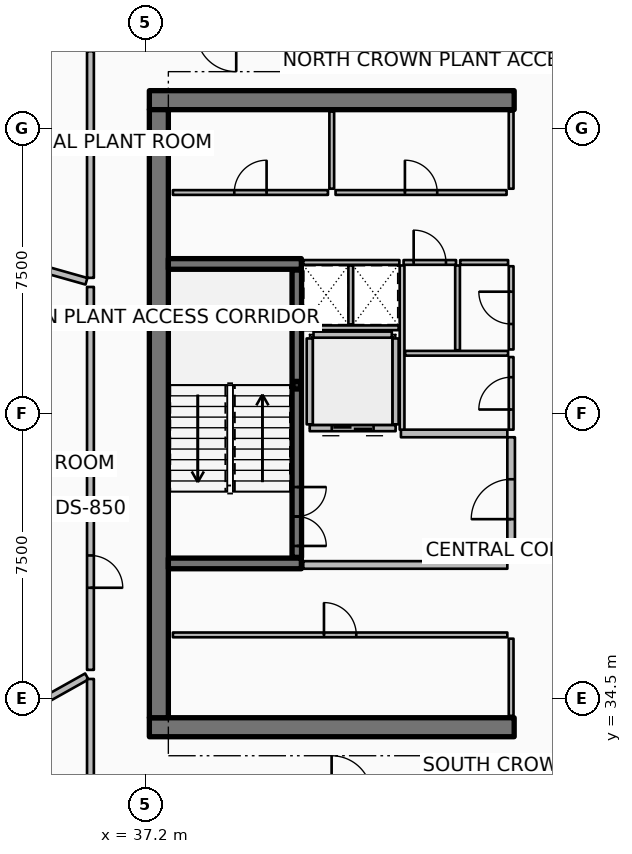
"""IFC4 building model, lengths in metres.
Left out: names, types, materials, properties, quantities, classifications, styles, units other than length and angle.
Written with IfcOpenShell. Run it as: python <this file> out.ifc"""

import sys

from ifc_helpers import new_model, si_unit, direction, frame, frame_2d, origin, origin_2d, place, context, subcontext, project, spatial, rectangle, hollow_rectangle, extrude, element, fill, save


model = new_model("IFC4")
c1 = context("Model", 3, precision=1e-05, world=origin(), true_north=direction((0.0, 1.0)))
c2 = subcontext(c1, "Body", "Model", "MODEL_VIEW")
j1 = project(units=[si_unit("LENGTHUNIT", "METRE"), si_unit("PLANEANGLEUNIT", "RADIAN")], contexts=[c1])
p1 = place(None, origin())
s1 = spatial("IfcSite", under=j1, at=p1, CompositionType="ELEMENT")
p2 = place(p1, origin())
s2 = spatial("IfcBuilding", under=s1, at=p2, CompositionType="ELEMENT")
p3 = place(p2, frame((0.0, 0.0, 359.6)))
s3 = spatial("IfcBuildingStorey", under=s2, at=p3, CompositionType="ELEMENT", Elevation=359.6)
for number, where, z_axis, x_axis in (
    (1, (37.3, 33.75, 0.0), (0.0, 0.0, 1.0), (1.0, 0.0, 0.0)),
    (2, (37.3, 50.25, 0.0), (0.0, 0.0, 1.0), (1.0, 0.0, 0.0)),
):
    element("IfcWall", number, at=place(p3, frame(where, z_axis=z_axis, x_axis=x_axis)), inside=s3, PredefinedType="SHEAR", context=c2, shape_type="SweptSolid", body=[
        extrude(rectangle(XDim=9.6, YDim=0.5, at=frame_2d((4.8, 0.0))), origin(), (0.0, 0.0, 1.0), 3.6),
    ])
p4 = place(p3, frame((37.55, 34.0, 0.0), z_axis=(0.0, 0.0, 1.0), x_axis=(0.0, 1.0, 0.0)))
e3 = element("IfcWall", 3, at=p4, inside=s3, PredefinedType="SHEAR", context=c2, shape_type="SweptSolid", body=[
    extrude(rectangle(XDim=16.0, YDim=0.5, at=frame_2d((8.0, 0.0))), origin(), (0.0, 0.0, 1.0), 3.6),
])
for number, where, z_axis, x_axis in (
    (4, (37.8, 38.06, 0.0), (0.0, 0.0, 1.0), (1.0, 0.0, 0.0)),
    (5, (37.8, 45.94, 0.0), (0.0, 0.0, 1.0), (1.0, 0.0, 0.0)),
):
    element("IfcWall", number, at=place(p3, frame(where, z_axis=z_axis, x_axis=x_axis)), inside=s3, PredefinedType="SHEAR", context=c2, shape_type="SweptSolid", body=[
        extrude(rectangle(XDim=3.5, YDim=0.28, at=frame_2d((1.75, 0.0))), origin(), (0.0, 0.0, 1.0), 3.6),
    ])
p5 = place(p3, frame((41.18, 42.75, 0.0), z_axis=(0.0, 0.0, 1.0), x_axis=(1.0, 0.0, 0.0)))
e6 = element("IfcColumn", 6, at=p5, inside=s3, PredefinedType="COLUMN", context=c2, shape_type="SweptSolid", body=[
    extrude(hollow_rectangle(XDim=0.2, YDim=0.2, WallThickness=0.01, InnerFilletRadius=0.01, OuterFilletRadius=0.02, at=origin_2d()), origin(), (0.0, 0.0, 1.0), 1.595),
])
p6 = place(p3, frame((41.18, 38.22, 0.0), z_axis=(0.0, 0.0, 1.0), x_axis=(0.0, 1.0, 0.0)))
e7 = element("IfcWall", 7, at=p6, inside=s3, PredefinedType="SOLIDWALL", context=c2, shape_type="SweptSolid", body=[
    extrude(rectangle(XDim=7.56, YDim=0.25, at=frame_2d((3.78, 0.0))), origin(), (0.0, 0.0, 1.0), 3.32),
])
p7 = place(p6, frame((0.3, 0.0, 0.0)))
e8 = element("IfcOpeningElement", 8, at=p7, cuts=e7, PredefinedType="OPENING", context=c2, shape_type="SweptSolid", body=[
    extrude(rectangle(XDim=1.55, YDim=2.15, at=frame_2d((0.775, 1.075))), frame((0.0, 0.135, 0.0), z_axis=(0.0, -1.0, 0.0), x_axis=(1.0, 0.0, 0.0)), (0.0, 0.0, 1.0), 0.27),
])
p8 = place(p3, frame((43.78, 41.62, 0.0), z_axis=(0.0, 0.0, 1.0), x_axis=(-1.0, 0.0, 0.0)))
e9 = element("IfcWall", 9, at=p8, inside=s3, PredefinedType="PARTITIONING", context=c2, shape_type="SweptSolid", body=[
    extrude(rectangle(XDim=2.26, YDim=0.16, at=frame_2d((1.13, 0.0))), origin(), (0.0, 0.0, 1.0), 3.32),
])
p9 = place(p8, frame((0.58, 0.0, 0.0)))
e10 = element("IfcOpeningElement", 10, at=p9, cuts=e9, PredefinedType="OPENING", context=c2, shape_type="SweptSolid", body=[
    extrude(rectangle(XDim=1.1, YDim=2.1, at=frame_2d((0.55, 1.05))), frame((0.0, 0.09, 0.0), z_axis=(0.0, -1.0, 0.0), x_axis=(1.0, 0.0, 0.0)), (0.0, 0.0, 1.0), 0.18),
])
for number, where, z_axis, x_axis in (
    (11, (43.78, 41.72, 0.0), (0.0, 0.0, 1.0), (0.0, 1.0, 0.0)),
    (12, (41.52, 41.72, 0.0), (0.0, 0.0, 1.0), (0.0, 1.0, 0.0)),
):
    element("IfcWall", number, at=place(p3, frame(where, z_axis=z_axis, x_axis=x_axis)), inside=s3, PredefinedType="PARTITIONING", context=c2, shape_type="SweptSolid", body=[
        extrude(rectangle(XDim=2.26, YDim=0.16, at=frame_2d((1.13, 0.0))), origin(), (0.0, 0.0, 1.0), 3.32),
    ])
p10 = place(p3, frame((41.62, 44.08, 0.0), z_axis=(0.0, 0.0, 1.0), x_axis=(1.0, 0.0, 0.0)))
e13 = element("IfcWall", 13, at=p10, inside=s3, PredefinedType="PARTITIONING", context=c2, shape_type="SweptSolid", body=[
    extrude(rectangle(XDim=2.06, YDim=0.16, at=frame_2d((1.03, 0.0))), origin(), (0.0, 0.0, 1.0), 3.32),
])
p11 = place(p3, frame((46.82, 34.05, 0.0), z_axis=(0.0, 0.0, 1.0), x_axis=(0.0, 1.0, 0.0)))
e14 = element("IfcWall", 14, at=p11, inside=s3, PredefinedType="PARTITIONING", context=c2, shape_type="SweptSolid", body=[
    extrude(rectangle(XDim=2.03, YDim=0.125, at=frame_2d((1.015, 0.0))), origin(), (0.0, 0.0, 1.0), 2.76),
])
p12 = place(p3, frame((37.92, 36.18, 0.0), z_axis=(0.0, 0.0, 1.0), x_axis=(1.0, 0.0, 0.0)))
e15 = element("IfcWall", 15, at=p12, inside=s3, PredefinedType="PARTITIONING", context=c2, shape_type="SweptSolid", body=[
    extrude(rectangle(XDim=8.8, YDim=0.125, at=frame_2d((4.4, 0.0))), origin(), (0.0, 0.0, 1.0), 2.76),
])
p13 = place(p12, frame((3.975, 0.0, 0.0)))
e16 = element("IfcOpeningElement", 16, at=p13, cuts=e15, PredefinedType="OPENING", context=c2, shape_type="SweptSolid", body=[
    extrude(rectangle(XDim=0.85, YDim=2.06, at=frame_2d((0.425, 1.03))), frame((0.0, 0.073, 0.0), z_axis=(0.0, -1.0, 0.0), x_axis=(1.0, 0.0, 0.0)), (0.0, 0.0, 1.0), 0.145),
])
for number, where, z_axis, x_axis in (
    (17, (46.82, 47.92, 0.0), (0.0, 0.0, 1.0), (0.0, 1.0, 0.0)),
    (18, (42.1, 47.92, 0.0), (0.0, 0.0, 1.0), (0.0, 1.0, 0.0)),
):
    element("IfcWall", number, at=place(p3, frame(where, z_axis=z_axis, x_axis=x_axis)), inside=s3, PredefinedType="PARTITIONING", context=c2, shape_type="SweptSolid", body=[
        extrude(rectangle(XDim=2.03, YDim=0.125, at=frame_2d((1.015, 0.0))), origin(), (0.0, 0.0, 1.0), 2.76),
    ])
p14 = place(p3, frame((37.92, 47.82, 0.0), z_axis=(0.0, 0.0, 1.0), x_axis=(1.0, 0.0, 0.0)))
e19 = element("IfcWall", 19, at=p14, inside=s3, PredefinedType="PARTITIONING", context=c2, shape_type="SweptSolid", body=[
    extrude(rectangle(XDim=4.08, YDim=0.125, at=frame_2d((2.04, 0.0))), origin(), (0.0, 0.0, 1.0), 2.76),
])
p15 = place(p14, frame((1.615, 0.0, 0.0)))
e20 = element("IfcOpeningElement", 20, at=p15, cuts=e19, PredefinedType="OPENING", context=c2, shape_type="SweptSolid", body=[
    extrude(rectangle(XDim=0.85, YDim=2.06, at=frame_2d((0.425, 1.03))), frame((0.0, 0.073, 0.0), z_axis=(0.0, -1.0, 0.0), x_axis=(1.0, 0.0, 0.0)), (0.0, 0.0, 1.0), 0.145),
])
p16 = place(p3, frame((42.2, 47.82, 0.0), z_axis=(0.0, 0.0, 1.0), x_axis=(1.0, 0.0, 0.0)))
e21 = element("IfcWall", 21, at=p16, inside=s3, PredefinedType="PARTITIONING", context=c2, shape_type="SweptSolid", body=[
    extrude(rectangle(XDim=4.5, YDim=0.125, at=frame_2d((2.25, 0.0))), origin(), (0.0, 0.0, 1.0), 2.76),
])
p17 = place(p16, frame((1.825, 0.0, 0.0)))
e22 = element("IfcOpeningElement", 22, at=p17, cuts=e21, PredefinedType="OPENING", context=c2, shape_type="SweptSolid", body=[
    extrude(rectangle(XDim=0.85, YDim=2.06, at=frame_2d((0.425, 1.03))), frame((0.0, 0.073, 0.0), z_axis=(0.0, -1.0, 0.0), x_axis=(1.0, 0.0, 0.0)), (0.0, 0.0, 1.0), 0.145),
])
p18 = place(p3, frame((41.35, 38.02, 0.0), z_axis=(0.0, 0.0, 1.0), x_axis=(1.0, 0.0, 0.0)))
e23 = element("IfcWall", 23, at=p18, inside=s3, PredefinedType="PARTITIONING", context=c2, shape_type="SweptSolid", body=[
    extrude(rectangle(XDim=5.37, YDim=0.2, at=frame_2d((2.685, 0.0))), origin(), (0.0, 0.0, 1.0), 3.32),
])
p19 = place(p3, frame((43.92, 41.48, 0.0), z_axis=(0.0, 0.0, 1.0), x_axis=(1.0, 0.0, 0.0)))
e24 = element("IfcWall", 24, at=p19, inside=s3, PredefinedType="PARTITIONING", context=c2, shape_type="SweptSolid", body=[
    extrude(rectangle(XDim=2.8, YDim=0.2, at=frame_2d((1.4, 0.0))), origin(), (0.0, 0.0, 1.0), 3.32),
])
p20 = place(p3, frame((46.82, 38.12, 0.0), z_axis=(0.0, 0.0, 1.0), x_axis=(0.0, 1.0, 0.0)))
e25 = element("IfcWall", 25, at=p20, inside=s3, PredefinedType="PARTITIONING", context=c2, shape_type="SweptSolid", body=[
    extrude(rectangle(XDim=3.26, YDim=0.2, at=frame_2d((1.63, 0.0))), origin(), (0.0, 0.0, 1.0), 3.32),
])
p21 = place(p20, frame((1.105, 0.0, 0.0)))
e26 = element("IfcOpeningElement", 26, at=p21, cuts=e25, PredefinedType="OPENING", context=c2, shape_type="SweptSolid", body=[
    extrude(rectangle(XDim=1.05, YDim=2.1, at=frame_2d((0.525, 1.05))), frame((0.0, 0.11, 0.0), z_axis=(0.0, -1.0, 0.0), x_axis=(1.0, 0.0, 0.0)), (0.0, 0.0, 1.0), 0.22),
])
p22 = place(p3, frame((41.36, 44.26, 0.0), z_axis=(0.0, 0.0, 1.0), x_axis=(1.0, 0.0, 0.0)))
e27 = element("IfcWall", 27, at=p22, inside=s3, PredefinedType="PARTITIONING", context=c2, shape_type="SweptSolid", body=[
    extrude(rectangle(XDim=2.5, YDim=0.125, at=frame_2d((1.25, 0.0))), origin(), (0.0, 0.0, 1.0), 2.76),
])
p23 = place(p3, frame((42.6, 44.35, 0.0), z_axis=(0.0, 0.0, 1.0), x_axis=(0.0, 1.0, 0.0)))
e28 = element("IfcWall", 28, at=p23, inside=s3, PredefinedType="PARTITIONING", context=c2, shape_type="SweptSolid", body=[
    extrude(rectangle(XDim=1.55, YDim=0.125, at=frame_2d((0.775, 0.0))), origin(), (0.0, 0.0, 1.0), 2.76),
])
p24 = place(p3, frame((43.95, 41.58, 0.0), z_axis=(0.0, 0.0, 1.0), x_axis=(0.0, 1.0, 0.0)))
e29 = element("IfcWall", 29, at=p24, inside=s3, PredefinedType="PARTITIONING", context=c2, shape_type="SweptSolid", body=[
    extrude(rectangle(XDim=4.32, YDim=0.125, at=frame_2d((2.16, 0.0))), origin(), (0.0, 0.0, 1.0), 2.76),
])
p25 = place(p3, frame((44.03, 43.59, 0.0), z_axis=(0.0, 0.0, 1.0), x_axis=(1.0, 0.0, 0.0)))
e30 = element("IfcWall", 30, at=p25, inside=s3, PredefinedType="PARTITIONING", context=c2, shape_type="SweptSolid", body=[
    extrude(rectangle(XDim=2.71, YDim=0.125, at=frame_2d((1.355, 0.0))), origin(), (0.0, 0.0, 1.0), 2.76),
])
p26 = place(p3, frame((45.41, 43.67, 0.0), z_axis=(0.0, 0.0, 1.0), x_axis=(0.0, 1.0, 0.0)))
e31 = element("IfcWall", 31, at=p26, inside=s3, PredefinedType="PARTITIONING", context=c2, shape_type="SweptSolid", body=[
    extrude(rectangle(XDim=2.23, YDim=0.125, at=frame_2d((1.115, 0.0))), origin(), (0.0, 0.0, 1.0), 2.76),
])
p27 = place(p3, frame((46.82, 41.58, 0.0), z_axis=(0.0, 0.0, 1.0), x_axis=(0.0, 1.0, 0.0)))
e32 = element("IfcWall", 32, at=p27, inside=s3, PredefinedType="PARTITIONING", context=c2, shape_type="SweptSolid", body=[
    extrude(rectangle(XDim=1.91, YDim=0.125, at=frame_2d((0.955, 0.0))), origin(), (0.0, 0.0, 1.0), 2.76),
])
p28 = place(p27, frame((0.53, 0.0, 0.0)))
e33 = element("IfcOpeningElement", 33, at=p28, cuts=e32, PredefinedType="OPENING", context=c2, shape_type="SweptSolid", body=[
    extrude(rectangle(XDim=0.85, YDim=2.06, at=frame_2d((0.425, 1.03))), frame((0.0, 0.073, 0.0), z_axis=(0.0, -1.0, 0.0), x_axis=(1.0, 0.0, 0.0)), (0.0, 0.0, 1.0), 0.145),
])
p29 = place(p3, frame((46.82, 43.69, 0.0), z_axis=(0.0, 0.0, 1.0), x_axis=(0.0, 1.0, 0.0)))
e34 = element("IfcWall", 34, at=p29, inside=s3, PredefinedType="PARTITIONING", context=c2, shape_type="SweptSolid", body=[
    extrude(rectangle(XDim=2.19, YDim=0.125, at=frame_2d((1.095, 0.0))), origin(), (0.0, 0.0, 1.0), 2.76),
])
p30 = place(p29, frame((0.67, 0.0, 0.0)))
e35 = element("IfcOpeningElement", 35, at=p30, cuts=e34, PredefinedType="OPENING", context=c2, shape_type="SweptSolid", body=[
    extrude(rectangle(XDim=0.85, YDim=2.06, at=frame_2d((0.425, 1.03))), frame((0.0, 0.073, 0.0), z_axis=(0.0, -1.0, 0.0), x_axis=(1.0, 0.0, 0.0)), (0.0, 0.0, 1.0), 0.145),
])
p31 = place(p3, frame((41.35, 45.98, 0.0), z_axis=(0.0, 0.0, 1.0), x_axis=(1.0, 0.0, 0.0)))
e36 = element("IfcWall", 36, at=p31, inside=s3, PredefinedType="PARTITIONING", context=c2, shape_type="SweptSolid", body=[
    extrude(rectangle(XDim=2.53, YDim=0.125, at=frame_2d((1.265, 0.0))), origin(), (0.0, 0.0, 1.0), 2.76),
])
p32 = place(p3, frame((43.99, 45.98, 0.0), z_axis=(0.0, 0.0, 1.0), x_axis=(1.0, 0.0, 0.0)))
e37 = element("IfcWall", 37, at=p32, inside=s3, PredefinedType="PARTITIONING", context=c2, shape_type="SweptSolid", body=[
    extrude(rectangle(XDim=1.38, YDim=0.125, at=frame_2d((0.69, 0.0))), origin(), (0.0, 0.0, 1.0), 2.76),
])
p33 = place(p32, frame((0.265, 0.0, 0.0)))
e38 = element("IfcOpeningElement", 38, at=p33, cuts=e37, PredefinedType="OPENING", context=c2, shape_type="SweptSolid", body=[
    extrude(rectangle(XDim=0.85, YDim=2.06, at=frame_2d((0.425, 1.03))), frame((0.0, 0.073, 0.0), z_axis=(0.0, -1.0, 0.0), x_axis=(1.0, 0.0, 0.0)), (0.0, 0.0, 1.0), 0.145),
])
p34 = place(p3, frame((45.48, 45.98, 0.0), z_axis=(0.0, 0.0, 1.0), x_axis=(1.0, 0.0, 0.0)))
e39 = element("IfcWall", 39, at=p34, inside=s3, PredefinedType="PARTITIONING", context=c2, shape_type="SweptSolid", body=[
    extrude(rectangle(XDim=1.26, YDim=0.125, at=frame_2d((0.63, 0.0))), origin(), (0.0, 0.0, 1.0), 2.76),
])
p35 = place(p3, frame((35.75, 51.537, 0.0), z_axis=(0.0, 0.0, 1.0), x_axis=(0.0, -1.0, 0.0)))
e40 = element("IfcWall", 40, at=p35, inside=s3, PredefinedType="PARTITIONING", context=c2, shape_type="SweptSolid", body=[
    extrude(rectangle(XDim=5.962, YDim=0.18, at=frame_2d((2.981, 0.0))), origin(), (0.0, 0.0, 1.0), 2.76),
])
p36 = place(p3, frame((35.644, 45.485, 0.0), z_axis=(0.0, 0.0, 1.0), x_axis=(-0.96245862205, 0.271428445159, 0.0)))
e41 = element("IfcWall", 41, at=p36, inside=s3, PredefinedType="PARTITIONING", context=c2, shape_type="SweptSolid", body=[
    extrude(rectangle(XDim=7.495, YDim=0.18, at=frame_2d((3.748, 0.0))), origin(), (0.0, 0.0, 1.0), 2.76),
])
p37 = place(p3, frame((35.75, 45.335, 0.0), z_axis=(0.0, 0.0, 1.0), x_axis=(0.0, -1.0, 0.0)))
e42 = element("IfcWall", 42, at=p37, inside=s3, PredefinedType="PARTITIONING", context=c2, shape_type="SweptSolid", body=[
    extrude(rectangle(XDim=4.665, YDim=0.18, at=frame_2d((2.333, 0.0))), origin(), (0.0, 0.0, 1.0), 2.76),
])
p38 = place(p3, frame((35.75, 40.43, 0.0), z_axis=(0.0, 0.0, 1.0), x_axis=(0.0, -1.0, 0.0)))
e43 = element("IfcWall", 43, at=p38, inside=s3, PredefinedType="PARTITIONING", context=c2, shape_type="SweptSolid", body=[
    extrude(rectangle(XDim=5.17, YDim=0.18, at=frame_2d((2.585, 0.0))), origin(), (0.0, 0.0, 1.0), 2.76),
])
p39 = place(p38, frame((2.16, 0.0, 0.0)))
e44 = element("IfcOpeningElement", 44, at=p39, cuts=e43, PredefinedType="OPENING", context=c2, shape_type="SweptSolid", body=[
    extrude(rectangle(XDim=0.85, YDim=2.06, at=frame_2d((0.425, 1.03))), frame((0.0, 0.1, 0.0), z_axis=(0.0, -1.0, 0.0), x_axis=(1.0, 0.0, 0.0)), (0.0, 0.0, 1.0), 0.2),
])
p40 = place(p3, frame((35.654, 35.086, 0.0), z_axis=(0.0, 0.0, 1.0), x_axis=(-0.872497667023, -0.488618277432, 0.0)))
e45 = element("IfcWall", 45, at=p40, inside=s3, PredefinedType="PARTITIONING", context=c2, shape_type="SweptSolid", body=[
    extrude(rectangle(XDim=6.981, YDim=0.18, at=frame_2d((3.491, 0.0))), origin(), (0.0, 0.0, 1.0), 2.76),
])
p41 = place(p3, frame((35.75, 35.02, 0.0), z_axis=(0.0, 0.0, 1.0), x_axis=(0.0, -1.0, 0.0)))
e46 = element("IfcWall", 46, at=p41, inside=s3, PredefinedType="PARTITIONING", context=c2, shape_type="SweptSolid", body=[
    extrude(rectangle(XDim=2.95, YDim=0.18, at=frame_2d((1.475, 0.0))), origin(), (0.0, 0.0, 1.0), 2.76),
])
p42 = place(p7, origin())
e47 = element("IfcDoor", 47, at=p42, inside=s3, OperationType="DOUBLE_DOOR_SINGLE_SWING", PredefinedType="DOOR", context=c2, shape_type="SweptSolid", body=[
    extrude(rectangle(XDim=1.55, YDim=2.15, at=frame_2d((0.775, 1.075))), frame((0.0, 0.025, 0.0), z_axis=(0.0, -1.0, 0.0), x_axis=(1.0, 0.0, 0.0)), (0.0, 0.0, 1.0), 0.05),
])
fill(e8, e47)
p43 = place(p9, origin())
e48 = element("IfcDoor", 48, at=p43, inside=s3, OperationType="DOUBLE_DOOR_SLIDING", PredefinedType="DOOR", context=c2, shape_type="SweptSolid", body=[
    extrude(rectangle(XDim=1.1, YDim=2.1, at=frame_2d((0.55, 1.05))), frame((0.0, 0.025, 0.0), z_axis=(0.0, -1.0, 0.0), x_axis=(1.0, 0.0, 0.0)), (0.0, 0.0, 1.0), 0.05),
])
fill(e10, e48)
p44 = place(p13, origin())
e49 = element("IfcDoor", 49, at=p44, inside=s3, OperationType="SINGLE_SWING_LEFT", PredefinedType="DOOR", context=c2, shape_type="SweptSolid", body=[
    extrude(rectangle(XDim=0.85, YDim=2.06, at=frame_2d((0.425, 1.03))), frame((0.0, 0.025, 0.0), z_axis=(0.0, -1.0, 0.0), x_axis=(1.0, 0.0, 0.0)), (0.0, 0.0, 1.0), 0.05),
])
fill(e16, e49)
p45 = place(p15, origin())
e50 = element("IfcDoor", 50, at=p45, inside=s3, OperationType="SINGLE_SWING_RIGHT", PredefinedType="DOOR", context=c2, shape_type="SweptSolid", body=[
    extrude(rectangle(XDim=0.85, YDim=2.06, at=frame_2d((0.425, 1.03))), frame((0.0, 0.025, 0.0), z_axis=(0.0, -1.0, 0.0), x_axis=(1.0, 0.0, 0.0)), (0.0, 0.0, 1.0), 0.05),
])
fill(e20, e50)
p46 = place(p17, origin())
e51 = element("IfcDoor", 51, at=p46, inside=s3, OperationType="SINGLE_SWING_LEFT", PredefinedType="DOOR", context=c2, shape_type="SweptSolid", body=[
    extrude(rectangle(XDim=0.85, YDim=2.06, at=frame_2d((0.425, 1.03))), frame((0.0, 0.025, 0.0), z_axis=(0.0, -1.0, 0.0), x_axis=(1.0, 0.0, 0.0)), (0.0, 0.0, 1.0), 0.05),
])
fill(e22, e51)
p47 = place(p21, origin())
e52 = element("IfcDoor", 52, at=p47, inside=s3, OperationType="SINGLE_SWING_LEFT", PredefinedType="DOOR", context=c2, shape_type="SweptSolid", body=[
    extrude(rectangle(XDim=1.05, YDim=2.1, at=frame_2d((0.525, 1.05))), frame((0.0, 0.025, 0.0), z_axis=(0.0, -1.0, 0.0), x_axis=(1.0, 0.0, 0.0)), (0.0, 0.0, 1.0), 0.05),
])
fill(e26, e52)
p48 = place(p28, origin())
e53 = element("IfcDoor", 53, at=p48, inside=s3, OperationType="SINGLE_SWING_LEFT", PredefinedType="DOOR", context=c2, shape_type="SweptSolid", body=[
    extrude(rectangle(XDim=0.85, YDim=2.06, at=frame_2d((0.425, 1.03))), frame((0.0, 0.025, 0.0), z_axis=(0.0, -1.0, 0.0), x_axis=(1.0, 0.0, 0.0)), (0.0, 0.0, 1.0), 0.05),
])
fill(e33, e53)
p49 = place(p30, origin())
e54 = element("IfcDoor", 54, at=p49, inside=s3, OperationType="SINGLE_SWING_RIGHT", PredefinedType="DOOR", context=c2, shape_type="SweptSolid", body=[
    extrude(rectangle(XDim=0.85, YDim=2.06, at=frame_2d((0.425, 1.03))), frame((0.0, 0.025, 0.0), z_axis=(0.0, -1.0, 0.0), x_axis=(1.0, 0.0, 0.0)), (0.0, 0.0, 1.0), 0.05),
])
fill(e35, e54)
p50 = place(p33, origin())
e55 = element("IfcDoor", 55, at=p50, inside=s3, OperationType="SINGLE_SWING_LEFT", PredefinedType="DOOR", context=c2, shape_type="SweptSolid", body=[
    extrude(rectangle(XDim=0.85, YDim=2.06, at=frame_2d((0.425, 1.03))), frame((0.0, 0.025, 0.0), z_axis=(0.0, -1.0, 0.0), x_axis=(1.0, 0.0, 0.0)), (0.0, 0.0, 1.0), 0.05),
])
fill(e38, e55)
p51 = place(p39, origin())
e56 = element("IfcDoor", 56, at=p51, inside=s3, OperationType="SINGLE_SWING_RIGHT", PredefinedType="DOOR", context=c2, shape_type="SweptSolid", body=[
    extrude(rectangle(XDim=0.85, YDim=2.06, at=frame_2d((0.425, 1.03))), frame((0.0, 0.025, 0.0), z_axis=(0.0, -1.0, 0.0), x_axis=(1.0, 0.0, 0.0)), (0.0, 0.0, 1.0), 0.05),
])
fill(e44, e56)
save(model, sys.argv[1])
